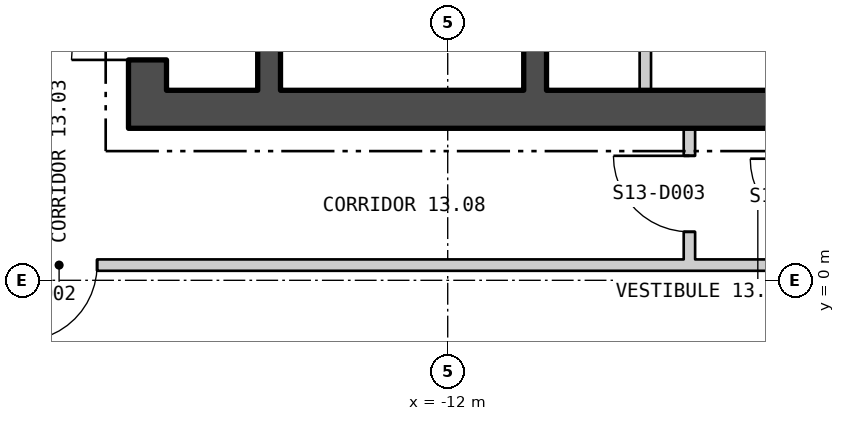
"""IFC4 building model, lengths in metres.
Left out: names, types, materials, properties, quantities, classifications, styles, units other than length and angle.
Written with IfcOpenShell. Run it as: python <this file> out.ifc"""

import sys

from ifc_helpers import new_model, si_unit, direction, frame, frame_2d, origin, place, context, subcontext, project, spatial, polyline, rectangle, outline, extrude, element, fill, save


model = new_model("IFC4")
c1 = context("Model", 3, precision=1e-05, world=origin(), true_north=direction((0.0, 1.0)))
c2 = subcontext(c1, "Body", "Model", "MODEL_VIEW")
j1 = project(units=[si_unit("LENGTHUNIT", "METRE"), si_unit("PLANEANGLEUNIT", "RADIAN")], contexts=[c1])
p1 = place(None, origin())
s1 = spatial("IfcSite", under=j1, at=p1, CompositionType="ELEMENT")
p2 = place(p1, origin())
s2 = spatial("IfcBuilding", under=s1, at=p2, CompositionType="ELEMENT")
p3 = place(p2, frame((0.0, 0.0, 174.9)))
s3 = spatial("IfcBuildingStorey", under=s2, at=p3, CompositionType="ELEMENT", Elevation=174.9)
p4 = place(p3, frame((-26.775, 13.22, -0.18), z_axis=(0.0, 0.0, 1.0), x_axis=(0.500000335318, -0.866025210188, 0.0)))
e1 = element("IfcWall", 1, at=p4, inside=s3, PredefinedType="SOLIDWALL", context=c2, shape_type="SweptSolid", body=[
    extrude(outline(polyline([(-0.13, -0.225), (45.88, -0.225), (45.62, 0.225), (0.13, 0.225), (-0.13, -0.225)])), origin(), (0.0, 0.0, 1.0), 3.68),
])
p5 = place(p4, frame((1.425, 0.0, 1.08)))
e2 = element("IfcOpeningElement", 2, at=p5, cuts=e1, PredefinedType="OPENING", context=c2, shape_type="SweptSolid", body=[
    extrude(rectangle(XDim=2.4, YDim=2.0, at=frame_2d((1.2, 1.0))), frame((0.0, 0.235, 0.0), z_axis=(0.0, -1.0, 0.0), x_axis=(1.0, 0.0, 0.0)), (0.0, 0.0, 1.0), 0.47),
])
p6 = place(p4, frame((5.895, 0.0, 1.08)))
e3 = element("IfcOpeningElement", 3, at=p6, cuts=e1, PredefinedType="OPENING", context=c2, shape_type="SweptSolid", body=[
    extrude(rectangle(XDim=2.4, YDim=2.0, at=frame_2d((1.2, 1.0))), frame((0.0, 0.235, 0.0), z_axis=(0.0, -1.0, 0.0), x_axis=(1.0, 0.0, 0.0)), (0.0, 0.0, 1.0), 0.47),
])
p7 = place(p4, frame((10.403, 0.0, 1.08)))
e4 = element("IfcOpeningElement", 4, at=p7, cuts=e1, PredefinedType="OPENING", context=c2, shape_type="SweptSolid", body=[
    extrude(rectangle(XDim=2.4, YDim=2.0, at=frame_2d((1.2, 1.0))), frame((0.0, 0.235, 0.0), z_axis=(0.0, -1.0, 0.0), x_axis=(1.0, 0.0, 0.0)), (0.0, 0.0, 1.0), 0.47),
])
p8 = place(p4, frame((14.912, 0.0, 1.08)))
e5 = element("IfcOpeningElement", 5, at=p8, cuts=e1, PredefinedType="OPENING", context=c2, shape_type="SweptSolid", body=[
    extrude(rectangle(XDim=2.4, YDim=2.0, at=frame_2d((1.2, 1.0))), frame((0.0, 0.235, 0.0), z_axis=(0.0, -1.0, 0.0), x_axis=(1.0, 0.0, 0.0)), (0.0, 0.0, 1.0), 0.47),
])
p9 = place(p4, frame((19.421, 0.0, 1.08)))
e6 = element("IfcOpeningElement", 6, at=p9, cuts=e1, PredefinedType="OPENING", context=c2, shape_type="SweptSolid", body=[
    extrude(rectangle(XDim=2.4, YDim=2.0, at=frame_2d((1.2, 1.0))), frame((0.0, 0.235, 0.0), z_axis=(0.0, -1.0, 0.0), x_axis=(1.0, 0.0, 0.0)), (0.0, 0.0, 1.0), 0.47),
])
p10 = place(p4, frame((23.929, 0.0, 1.08)))
e7 = element("IfcOpeningElement", 7, at=p10, cuts=e1, PredefinedType="OPENING", context=c2, shape_type="SweptSolid", body=[
    extrude(rectangle(XDim=2.4, YDim=2.0, at=frame_2d((1.2, 1.0))), frame((0.0, 0.235, 0.0), z_axis=(0.0, -1.0, 0.0), x_axis=(1.0, 0.0, 0.0)), (0.0, 0.0, 1.0), 0.47),
])
p11 = place(p4, frame((28.438, 0.0, 1.08)))
e8 = element("IfcOpeningElement", 8, at=p11, cuts=e1, PredefinedType="OPENING", context=c2, shape_type="SweptSolid", body=[
    extrude(rectangle(XDim=2.4, YDim=2.0, at=frame_2d((1.2, 1.0))), frame((0.0, 0.235, 0.0), z_axis=(0.0, -1.0, 0.0), x_axis=(1.0, 0.0, 0.0)), (0.0, 0.0, 1.0), 0.47),
])
p12 = place(p4, frame((32.947, 0.0, 1.08)))
e9 = element("IfcOpeningElement", 9, at=p12, cuts=e1, PredefinedType="OPENING", context=c2, shape_type="SweptSolid", body=[
    extrude(rectangle(XDim=2.4, YDim=2.0, at=frame_2d((1.2, 1.0))), frame((0.0, 0.235, 0.0), z_axis=(0.0, -1.0, 0.0), x_axis=(1.0, 0.0, 0.0)), (0.0, 0.0, 1.0), 0.47),
])
p13 = place(p4, frame((37.455, 0.0, 1.08)))
e10 = element("IfcOpeningElement", 10, at=p13, cuts=e1, PredefinedType="OPENING", context=c2, shape_type="SweptSolid", body=[
    extrude(rectangle(XDim=2.4, YDim=2.0, at=frame_2d((1.2, 1.0))), frame((0.0, 0.235, 0.0), z_axis=(0.0, -1.0, 0.0), x_axis=(1.0, 0.0, 0.0)), (0.0, 0.0, 1.0), 0.47),
])
p14 = place(p4, frame((41.925, 0.0, 1.08)))
e11 = element("IfcOpeningElement", 11, at=p14, cuts=e1, PredefinedType="OPENING", context=c2, shape_type="SweptSolid", body=[
    extrude(rectangle(XDim=2.4, YDim=2.0, at=frame_2d((1.2, 1.0))), frame((0.0, 0.235, 0.0), z_axis=(0.0, -1.0, 0.0), x_axis=(1.0, 0.0, 0.0)), (0.0, 0.0, 1.0), 0.47),
])
p15 = place(p3, frame((-16.2, 2.25, 0.0), z_axis=(0.0, 0.0, 1.0), x_axis=(1.0, 0.0, 0.0)))
e12 = element("IfcWall", 12, at=p15, inside=s3, PredefinedType="SHEAR", context=c2, shape_type="SweptSolid", body=[
    extrude(rectangle(XDim=32.4, YDim=0.5, at=frame_2d((16.2, 0.0))), origin(), (0.0, 0.0, 1.0), 3.7),
])
p16 = place(p15, frame((10.7, 0.0, 0.0)))
e13 = element("IfcOpeningElement", 13, at=p16, cuts=e12, PredefinedType="OPENING", context=c2, shape_type="SweptSolid", body=[
    extrude(rectangle(XDim=1.8, YDim=2.4, at=frame_2d((0.9, 1.2))), frame((0.0, 0.26, 0.0), z_axis=(0.0, -1.0, 0.0), x_axis=(1.0, 0.0, 0.0)), (0.0, 0.0, 1.0), 0.52),
])
p17 = place(p15, frame((20.7, 0.0, 0.0)))
e14 = element("IfcOpeningElement", 14, at=p17, cuts=e12, PredefinedType="OPENING", context=c2, shape_type="SweptSolid", body=[
    extrude(rectangle(XDim=1.8, YDim=2.4, at=frame_2d((0.9, 1.2))), frame((0.0, 0.26, 0.0), z_axis=(0.0, -1.0, 0.0), x_axis=(1.0, 0.0, 0.0)), (0.0, 0.0, 1.0), 0.52),
])
p18 = place(p3, frame((-15.95, 2.5, 0.0), z_axis=(0.0, 0.0, 1.0), x_axis=(0.0, 1.0, 0.0)))
e15 = element("IfcWall", 15, at=p18, inside=s3, PredefinedType="SHEAR", context=c2, shape_type="SweptSolid", body=[
    extrude(rectangle(XDim=15.0, YDim=0.5, at=frame_2d((7.5, 0.0))), origin(), (0.0, 0.0, 1.0), 3.7),
])
p19 = place(p18, frame((4.35, 0.0, 0.0)))
e16 = element("IfcOpeningElement", 16, at=p19, cuts=e15, PredefinedType="OPENING", context=c2, shape_type="SweptSolid", body=[
    extrude(rectangle(XDim=1.5, YDim=2.1, at=frame_2d((0.75, 1.05))), frame((0.0, 0.26, 0.0), z_axis=(0.0, -1.0, 0.0), x_axis=(1.0, 0.0, 0.0)), (0.0, 0.0, 1.0), 0.52),
])
p20 = place(p18, frame((0.4, 0.0, 0.0)))
e17 = element("IfcOpeningElement", 17, at=p20, cuts=e15, PredefinedType="OPENING", context=c2, shape_type="SweptSolid", body=[
    extrude(rectangle(XDim=1.0, YDim=2.1, at=frame_2d((0.5, 1.05))), frame((0.0, 0.26, 0.0), z_axis=(0.0, -1.0, 0.0), x_axis=(1.0, 0.0, 0.0)), (0.0, 0.0, 1.0), 0.52),
])
p21 = place(p18, frame((2.475, 0.0, 0.0)))
e18 = element("IfcOpeningElement", 18, at=p21, cuts=e15, PredefinedType="OPENING", context=c2, shape_type="SweptSolid", body=[
    extrude(rectangle(XDim=0.9, YDim=2.1, at=frame_2d((0.45, 1.05))), frame((0.0, 0.26, 0.0), z_axis=(0.0, -1.0, 0.0), x_axis=(1.0, 0.0, 0.0)), (0.0, 0.0, 1.0), 0.52),
])
p22 = place(p18, frame((6.677, 0.0, 0.0)))
e19 = element("IfcOpeningElement", 19, at=p22, cuts=e15, PredefinedType="OPENING", context=c2, shape_type="SweptSolid", body=[
    extrude(rectangle(XDim=0.9, YDim=2.1, at=frame_2d((0.45, 1.05))), frame((0.0, 0.26, 0.0), z_axis=(0.0, -1.0, 0.0), x_axis=(1.0, 0.0, 0.0)), (0.0, 0.0, 1.0), 0.52),
])
p23 = place(p18, frame((11.252, 0.0, 0.0)))
e20 = element("IfcOpeningElement", 20, at=p23, cuts=e15, PredefinedType="OPENING", context=c2, shape_type="SweptSolid", body=[
    extrude(rectangle(XDim=0.9, YDim=2.1, at=frame_2d((0.45, 1.05))), frame((0.0, 0.26, 0.0), z_axis=(0.0, -1.0, 0.0), x_axis=(1.0, 0.0, 0.0)), (0.0, 0.0, 1.0), 0.52),
])
p24 = place(p3, frame((-10.85, 2.5, 0.0), z_axis=(0.0, 0.0, 1.0), x_axis=(0.0, 1.0, 0.0)))
e21 = element("IfcWall", 21, at=p24, inside=s3, PredefinedType="SHEAR", context=c2, shape_type="SweptSolid", body=[
    extrude(rectangle(XDim=15.0, YDim=0.3, at=frame_2d((7.5, 0.0))), origin(), (0.0, 0.0, 1.0), 3.7),
])
p25 = place(p24, frame((3.475, 0.0, 0.0)))
e22 = element("IfcOpeningElement", 22, at=p25, cuts=e21, PredefinedType="OPENING", context=c2, shape_type="SweptSolid", body=[
    extrude(rectangle(XDim=1.25, YDim=2.1, at=frame_2d((0.625, 1.05))), frame((0.0, 0.16, 0.0), z_axis=(0.0, -1.0, 0.0), x_axis=(1.0, 0.0, 0.0)), (0.0, 0.0, 1.0), 0.32),
])
p26 = place(p24, frame((1.125, 0.0, 0.0)))
e23 = element("IfcOpeningElement", 23, at=p26, cuts=e21, PredefinedType="OPENING", context=c2, shape_type="SweptSolid", body=[
    extrude(rectangle(XDim=1.0, YDim=2.1, at=frame_2d((0.5, 1.05))), frame((0.0, 0.16, 0.0), z_axis=(0.0, -1.0, 0.0), x_axis=(1.0, 0.0, 0.0)), (0.0, 0.0, 1.0), 0.32),
])
p27 = place(p3, frame((-14.35, 2.5, 0.0), z_axis=(0.0, 0.0, 1.0), x_axis=(0.0, 1.0, 0.0)))
e24 = element("IfcWall", 24, at=p27, inside=s3, PredefinedType="SHEAR", context=c2, shape_type="SweptSolid", body=[
    extrude(rectangle(XDim=15.0, YDim=0.3, at=frame_2d((7.5, 0.0))), origin(), (0.0, 0.0, 1.0), 3.7),
])
p28 = place(p27, frame((4.35, 0.0, 0.0)))
e25 = element("IfcOpeningElement", 25, at=p28, cuts=e24, PredefinedType="OPENING", context=c2, shape_type="SweptSolid", body=[
    extrude(rectangle(XDim=1.5, YDim=2.1, at=frame_2d((0.75, 1.05))), frame((0.0, 0.16, 0.0), z_axis=(0.0, -1.0, 0.0), x_axis=(1.0, 0.0, 0.0)), (0.0, 0.0, 1.0), 0.32),
])
p29 = place(p3, frame((-9.4, 2.5, 0.0), z_axis=(0.0, 0.0, 1.0), x_axis=(0.0, 1.0, 0.0)))
e26 = element("IfcWall", 26, at=p29, inside=s3, PredefinedType="PARTITIONING", context=c2, shape_type="SweptSolid", body=[
    extrude(rectangle(XDim=2.975, YDim=0.15, at=frame_2d((1.488, 0.0))), origin(), (0.0, 0.0, 1.0), 3.7),
])
p30 = place(p3, frame((-17.925, 0.2, 0.0), z_axis=(0.0, 0.0, 1.0), x_axis=(1.0, 0.0, 0.0)))
e27 = element("IfcWall", 27, at=p30, inside=s3, PredefinedType="PARTITIONING", context=c2, shape_type="SweptSolid", body=[
    extrude(rectangle(XDim=10.83, YDim=0.15, at=frame_2d((5.415, 0.0))), origin(), (0.0, 0.0, 1.0), 3.7),
])
p31 = place(p30, frame((0.312, 0.0, 0.0)))
e28 = element("IfcOpeningElement", 28, at=p31, cuts=e27, PredefinedType="OPENING", context=c2, shape_type="SweptSolid", body=[
    extrude(rectangle(XDim=1.0, YDim=2.1, at=frame_2d((0.5, 1.05))), frame((0.0, 0.085, 0.0), z_axis=(0.0, -1.0, 0.0), x_axis=(1.0, 0.0, 0.0)), (0.0, 0.0, 1.0), 0.17),
])
p32 = place(p3, frame((-8.82, 0.275, 0.0), z_axis=(0.0, 0.0, 1.0), x_axis=(0.0, 1.0, 0.0)))
e29 = element("IfcWall", 29, at=p32, inside=s3, PredefinedType="PARTITIONING", context=c2, shape_type="SweptSolid", body=[
    extrude(rectangle(XDim=1.725, YDim=0.15, at=frame_2d((0.863, 0.0))), origin(), (0.0, 0.0, 1.0), 3.7),
])
p33 = place(p32, frame((0.363, 0.0, 0.0)))
e30 = element("IfcOpeningElement", 30, at=p33, cuts=e29, PredefinedType="OPENING", context=c2, shape_type="SweptSolid", body=[
    extrude(rectangle(XDim=1.0, YDim=2.1, at=frame_2d((0.5, 1.05))), frame((0.0, 0.085, 0.0), z_axis=(0.0, -1.0, 0.0), x_axis=(1.0, 0.0, 0.0)), (0.0, 0.0, 1.0), 0.17),
])
p34 = place(p20, origin())
e31 = element("IfcDoor", 31, at=p34, inside=s3, OperationType="SINGLE_SWING_RIGHT", PredefinedType="DOOR", context=c2, shape_type="SweptSolid", body=[
    extrude(rectangle(XDim=1.0, YDim=2.1, at=frame_2d((0.5, 1.05))), frame((0.0, 0.025, 0.0), z_axis=(0.0, -1.0, 0.0), x_axis=(1.0, 0.0, 0.0)), (0.0, 0.0, 1.0), 0.05),
])
fill(e17, e31)
p35 = place(p31, origin())
e32 = element("IfcDoor", 32, at=p35, inside=s3, OperationType="SINGLE_SWING_LEFT", PredefinedType="DOOR", context=c2, shape_type="SweptSolid", body=[
    extrude(rectangle(XDim=1.0, YDim=2.1, at=frame_2d((0.5, 1.05))), frame((0.0, 0.025, 0.0), z_axis=(0.0, -1.0, 0.0), x_axis=(1.0, 0.0, 0.0)), (0.0, 0.0, 1.0), 0.05),
])
fill(e28, e32)
p36 = place(p33, origin())
e33 = element("IfcDoor", 33, at=p36, inside=s3, OperationType="SINGLE_SWING_LEFT", PredefinedType="DOOR", context=c2, shape_type="SweptSolid", body=[
    extrude(rectangle(XDim=1.0, YDim=2.1, at=frame_2d((0.5, 1.05))), frame((0.0, 0.025, 0.0), z_axis=(0.0, -1.0, 0.0), x_axis=(1.0, 0.0, 0.0)), (0.0, 0.0, 1.0), 0.05),
])
fill(e30, e33)
save(model, sys.argv[1])
